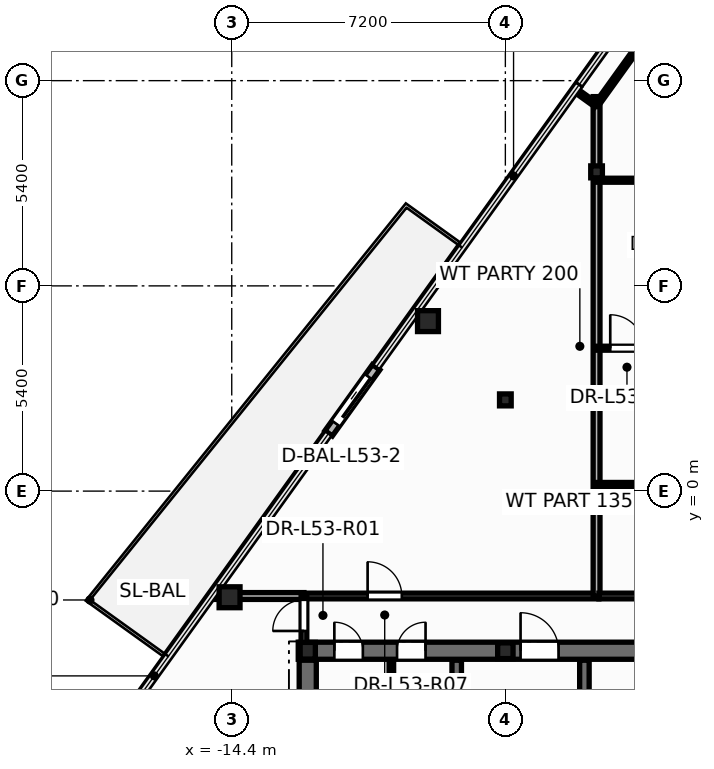
"""IFC4 building model, lengths in metres.
Left out: names, types, materials, properties, quantities, classifications, styles, units other than length and angle.
Written with IfcOpenShell. Run it as: python <this file> out.ifc"""

import sys

from ifc_helpers import new_model, si_unit, direction, frame, frame_2d, origin, origin_2d, place, context, subcontext, project, spatial, rectangle, hollow_circle, i_section, extrude, element, fill, save


model = new_model("IFC4")
c1 = context("Model", 3, precision=1e-05, world=origin(), true_north=direction((0.0, 1.0)))
c2 = subcontext(c1, "Body", "Model", "MODEL_VIEW")
j1 = project(units=[si_unit("LENGTHUNIT", "METRE"), si_unit("PLANEANGLEUNIT", "RADIAN")], contexts=[c1])
p1 = place(None, origin())
s1 = spatial("IfcSite", under=j1, at=p1, CompositionType="ELEMENT")
p2 = place(p1, origin())
s2 = spatial("IfcBuilding", under=s1, at=p2, CompositionType="ELEMENT")
p3 = place(p2, frame((0.0, 0.0, 203.7)))
s3 = spatial("IfcBuildingStorey", under=s2, at=p3, CompositionType="ELEMENT", Elevation=203.7)
for number, where, z_axis, x_axis in (
    (1, (-9.236, 4.473, 0.0), (0.0, 0.0, 1.0), (1.0, 0.0, 0.0)),
    (2, (-14.457, -2.793, 0.0), (0.0, 0.0, 1.0), (1.0, 0.0, 0.0)),
):
    element("IfcColumn", number, at=place(p3, frame(where, z_axis=z_axis, x_axis=x_axis)), inside=s3, PredefinedType="COLUMN", context=c2, shape_type="SweptSolid", body=[
        extrude(hollow_circle(Radius=0.275, WallThickness=0.024, at=origin_2d()), origin(), (0.0, 0.0, 1.0), 3.6),
    ])
p4 = place(p3, frame((-12.4, -4.2, 0.0), z_axis=(0.0, 0.0, 1.0), x_axis=(1.0, 0.0, 0.0)))
e3 = element("IfcColumn", 3, at=p4, inside=s3, PredefinedType="COLUMN", context=c2, shape_type="SweptSolid", body=[
    extrude(i_section(OverallWidth=0.4, OverallDepth=0.44, WebThickness=0.028, FlangeThickness=0.04, at=origin_2d()), origin(), (0.0, 0.0, 1.0), 3.6),
])
p5 = place(p3, frame((-7.2, -4.2, 0.0), z_axis=(0.0, 0.0, 1.0), x_axis=(1.0, 0.0, 0.0)))
e4 = element("IfcColumn", 4, at=p5, inside=s3, PredefinedType="PILASTER", context=c2, shape_type="SweptSolid", body=[
    extrude(i_section(OverallWidth=0.405, OverallDepth=0.414, WebThickness=0.022, FlangeThickness=0.032, at=origin_2d()), origin(), (0.0, 0.0, 1.0), 3.6),
])
for number, where, z_axis, x_axis in (
    (5, (-7.2, 2.4, 0.0), (0.0, 0.0, 1.0), (1.0, 0.0, 0.0)),
    (6, (-4.8, 8.4, 0.0), (0.0, 0.0, 1.0), (1.0, 0.0, 0.0)),
):
    element("IfcColumn", number, at=place(p3, frame(where, z_axis=z_axis, x_axis=x_axis)), inside=s3, PredefinedType="COLUMN", context=c2, shape_type="SweptSolid", body=[
        extrude(i_section(OverallWidth=0.307, OverallDepth=0.314, WebThickness=0.012, FlangeThickness=0.019, at=origin_2d()), origin(), (0.0, 0.0, 1.0), 3.6),
    ])
p6 = place(p3, frame((-10.601, 3.259, -0.015), z_axis=(0.0, 0.0, 1.0), x_axis=(-0.583556118157, -0.812072815061, 0.0)))
e7 = element("IfcWall", 7, at=p6, inside=s3, PredefinedType="STANDARD", context=c2, shape_type="SweptSolid", body=[
    extrude(rectangle(XDim=2.14, YDim=0.24, at=frame_2d((1.07, 0.0))), origin(), (0.0, 0.0, 1.0), 2.802),
])
p7 = place(p6, frame((0.32, 0.0, 0.015)))
e8 = element("IfcOpeningElement", 8, at=p7, cuts=e7, PredefinedType="OPENING", context=c2, shape_type="SweptSolid", body=[
    extrude(rectangle(XDim=1.506, YDim=2.204, at=frame_2d((0.75, 1.102))), frame((0.0, 0.13, 0.0), z_axis=(0.0, -1.0, 0.0), x_axis=(1.0, 0.0, 0.0)), (0.0, 0.0, 1.0), 0.26),
])
p8 = place(p3, frame((-10.2, -5.52, 0.0), z_axis=(0.0, 0.0, 1.0), x_axis=(0.0, 1.0, 0.0)))
e9 = element("IfcWall", 9, at=p8, inside=s3, PredefinedType="PARTITIONING", context=c2, shape_type="SweptSolid", body=[
    extrude(rectangle(XDim=1.12, YDim=0.12, at=frame_2d((0.56, 0.0))), origin(), (0.0, 0.0, 1.0), 3.345),
])
p9 = place(p3, frame((-12.65, -4.2, 0.0), z_axis=(0.0, 0.0, 1.0), x_axis=(1.0, 0.0, 0.0)))
e10 = element("IfcWall", 10, at=p9, inside=s3, PredefinedType="SHEAR", context=c2, shape_type="SweptSolid", body=[
    extrude(rectangle(XDim=25.3, YDim=0.45, at=frame_2d((12.65, 0.0))), origin(), (0.0, 0.0, 1.0), 3.6),
])
p10 = place(p9, frame((0.95, 0.0, 0.0)))
e11 = element("IfcOpeningElement", 11, at=p10, cuts=e10, PredefinedType="OPENING", context=c2, shape_type="SweptSolid", body=[
    extrude(rectangle(XDim=0.756, YDim=2.054, at=frame_2d((0.375, 1.027))), frame((0.0, 0.235, 0.0), z_axis=(0.0, -1.0, 0.0), x_axis=(1.0, 0.0, 0.0)), (0.0, 0.0, 1.0), 0.47),
])
p11 = place(p9, frame((2.6, 0.0, 0.0)))
e12 = element("IfcOpeningElement", 12, at=p11, cuts=e10, PredefinedType="OPENING", context=c2, shape_type="SweptSolid", body=[
    extrude(rectangle(XDim=0.756, YDim=2.054, at=frame_2d((0.375, 1.027))), frame((0.0, 0.235, 0.0), z_axis=(0.0, -1.0, 0.0), x_axis=(1.0, 0.0, 0.0)), (0.0, 0.0, 1.0), 0.47),
])
p12 = place(p9, frame((21.85, 0.0, 0.0)))
e13 = element("IfcOpeningElement", 13, at=p12, cuts=e10, PredefinedType="OPENING", context=c2, shape_type="SweptSolid", body=[
    extrude(rectangle(XDim=0.756, YDim=2.054, at=frame_2d((0.375, 1.027))), frame((0.0, 0.235, 0.0), z_axis=(0.0, -1.0, 0.0), x_axis=(1.0, 0.0, 0.0)), (0.0, 0.0, 1.0), 0.47),
])
p13 = place(p9, frame((23.5, 0.0, 0.0)))
e14 = element("IfcOpeningElement", 14, at=p13, cuts=e10, PredefinedType="OPENING", context=c2, shape_type="SweptSolid", body=[
    extrude(rectangle(XDim=0.756, YDim=2.054, at=frame_2d((0.375, 1.027))), frame((0.0, 0.235, 0.0), z_axis=(0.0, -1.0, 0.0), x_axis=(1.0, 0.0, 0.0)), (0.0, 0.0, 1.0), 0.47),
])
p14 = place(p9, frame((5.85, 0.0, 0.0)))
e15 = element("IfcOpeningElement", 15, at=p14, cuts=e10, PredefinedType="OPENING", context=c2, shape_type="SweptSolid", body=[
    extrude(rectangle(XDim=1.006, YDim=2.104, at=frame_2d((0.5, 1.052))), frame((0.0, 0.235, 0.0), z_axis=(0.0, -1.0, 0.0), x_axis=(1.0, 0.0, 0.0)), (0.0, 0.0, 1.0), 0.47),
])
p15 = place(p9, frame((10.35, 0.0, 0.0)))
e16 = element("IfcOpeningElement", 16, at=p15, cuts=e10, PredefinedType="OPENING", context=c2, shape_type="SweptSolid", body=[
    extrude(rectangle(XDim=1.406, YDim=2.154, at=frame_2d((0.7, 1.077))), frame((0.0, 0.235, 0.0), z_axis=(0.0, -1.0, 0.0), x_axis=(1.0, 0.0, 0.0)), (0.0, 0.0, 1.0), 0.47),
])
p16 = place(p9, frame((18.45, 0.0, 0.0)))
e17 = element("IfcOpeningElement", 17, at=p16, cuts=e10, PredefinedType="OPENING", context=c2, shape_type="SweptSolid", body=[
    extrude(rectangle(XDim=1.006, YDim=2.104, at=frame_2d((0.5, 1.052))), frame((0.0, 0.235, 0.0), z_axis=(0.0, -1.0, 0.0), x_axis=(1.0, 0.0, 0.0)), (0.0, 0.0, 1.0), 0.47),
])
p17 = place(p3, frame((-8.48, -13.85, 0.0), z_axis=(0.0, 0.0, 1.0), x_axis=(0.0, 1.0, 0.0)))
e18 = element("IfcWall", 18, at=p17, inside=s3, PredefinedType="SHEAR", context=c2, shape_type="SweptSolid", body=[
    extrude(rectangle(XDim=9.4, YDim=0.25, at=frame_2d((4.7, 0.0))), origin(), (0.0, 0.0, 1.0), 3.6),
])
p18 = place(p17, frame((6.95, 0.0, 0.0)))
e19 = element("IfcOpeningElement", 19, at=p18, cuts=e18, PredefinedType="OPENING", context=c2, shape_type="SweptSolid", body=[
    extrude(rectangle(XDim=1.006, YDim=2.104, at=frame_2d((0.5, 1.052))), frame((0.0, 0.135, 0.0), z_axis=(0.0, -1.0, 0.0), x_axis=(1.0, 0.0, 0.0)), (0.0, 0.0, 1.0), 0.27),
])
p19 = place(p3, frame((-5.12, -13.85, 0.0), z_axis=(0.0, 0.0, 1.0), x_axis=(0.0, 1.0, 0.0)))
e20 = element("IfcWall", 20, at=p19, inside=s3, PredefinedType="SHEAR", context=c2, shape_type="SweptSolid", body=[
    extrude(rectangle(XDim=9.4, YDim=0.25, at=frame_2d((4.7, 0.0))), origin(), (0.0, 0.0, 1.0), 3.6),
])
p20 = place(p3, frame((-12.4, -13.85, 0.0), z_axis=(0.0, 0.0, 1.0), x_axis=(0.0, 1.0, 0.0)))
e21 = element("IfcWall", 21, at=p20, inside=s3, PredefinedType="SHEAR", context=c2, shape_type="SweptSolid", body=[
    extrude(rectangle(XDim=9.4, YDim=0.45, at=frame_2d((4.7, 0.0))), origin(), (0.0, 0.0, 1.0), 3.6),
])
p21 = place(p3, frame((-12.5, -2.76, 0.0), z_axis=(0.0, 0.0, 1.0), x_axis=(1.0, 0.0, 0.0)))
e22 = element("IfcWall", 22, at=p21, inside=s3, PredefinedType="PARTITIONING", context=c2, shape_type="SweptSolid", body=[
    extrude(rectangle(XDim=7.76, YDim=0.15, at=frame_2d((3.88, 0.0))), origin(), (0.0, 0.0, 1.0), 2.32),
])
p22 = place(p21, frame((1.675, 0.0, 0.0)))
e23 = element("IfcOpeningElement", 23, at=p22, cuts=e22, PredefinedType="OPENING", context=c2, shape_type="SweptSolid", body=[
    extrude(rectangle(XDim=0.906, YDim=2.104, at=frame_2d((0.45, 1.052))), frame((0.0, 0.085, 0.0), z_axis=(0.0, -1.0, 0.0), x_axis=(1.0, 0.0, 0.0)), (0.0, 0.0, 1.0), 0.17),
])
p23 = place(p3, frame((-4.8, -2.76, 0.0), z_axis=(0.0, 0.0, 1.0), x_axis=(0.0, 1.0, 0.0)))
e24 = element("IfcWall", 24, at=p23, inside=s3, PredefinedType="PARTITIONING", context=c2, shape_type="SweptSolid", body=[
    extrude(rectangle(XDim=13.14, YDim=0.18, at=frame_2d((6.57, 0.0))), origin(), (0.0, 0.0, 1.0), 2.32),
])
p24 = place(p3, frame((-4.8, 8.18, 0.0), z_axis=(0.0, 0.0, 1.0), x_axis=(1.0, 0.0, 0.0)))
e25 = element("IfcWall", 25, at=p24, inside=s3, PredefinedType="PARTITIONING", context=c2, shape_type="SweptSolid", body=[
    extrude(rectangle(XDim=3.46, YDim=0.105, at=frame_2d((1.73, 0.0))), origin(), (0.0, 0.0, 1.0), 2.62),
])
p25 = place(p24, frame((1.944, 0.0, 0.0)))
e26 = element("IfcOpeningElement", 26, at=p25, cuts=e25, PredefinedType="OPENING", context=c2, shape_type="SweptSolid", body=[
    extrude(rectangle(XDim=0.886, YDim=2.104, at=frame_2d((0.44, 1.052))), frame((0.0, 0.062, 0.0), z_axis=(0.0, -1.0, 0.0), x_axis=(1.0, 0.0, 0.0)), (0.0, 0.0, 1.0), 0.125),
])
p26 = place(p3, frame((-4.738, -2.76, 0.0), z_axis=(0.0, 0.0, 1.0), x_axis=(1.0, 0.0, 0.0)))
e27 = element("IfcWall", 27, at=p26, inside=s3, PredefinedType="PARTITIONING", context=c2, shape_type="SweptSolid", body=[
    extrude(rectangle(XDim=2.476, YDim=0.15, at=frame_2d((1.238, 0.0))), origin(), (0.0, 0.0, 1.0), 2.964),
])
p27 = place(p3, frame((-4.8, 0.16, 0.0), z_axis=(0.0, 0.0, 1.0), x_axis=(1.0, 0.0, 0.0)))
e28 = element("IfcWall", 28, at=p27, inside=s3, PredefinedType="PARTITIONING", context=c2, shape_type="SweptSolid", body=[
    extrude(rectangle(XDim=2.6, YDim=0.135, at=frame_2d((1.3, 0.0))), origin(), (0.0, 0.0, 1.0), 2.964),
])
p28 = place(p3, frame((-4.8, 3.76, 0.0), z_axis=(0.0, 0.0, 1.0), x_axis=(1.0, 0.0, 0.0)))
e29 = element("IfcWall", 29, at=p28, inside=s3, PredefinedType="PARTITIONING", context=c2, shape_type="SweptSolid", body=[
    extrude(rectangle(XDim=2.6, YDim=0.105, at=frame_2d((1.3, 0.0))), origin(), (0.0, 0.0, 1.0), 2.964),
])
p29 = place(p28, frame((0.36, 0.0, 0.0)))
e30 = element("IfcOpeningElement", 30, at=p29, cuts=e29, PredefinedType="OPENING", context=c2, shape_type="SweptSolid", body=[
    extrude(rectangle(XDim=0.886, YDim=2.104, at=frame_2d((0.44, 1.052))), frame((0.0, 0.062, 0.0), z_axis=(0.0, -1.0, 0.0), x_axis=(1.0, 0.0, 0.0)), (0.0, 0.0, 1.0), 0.125),
])
p30 = place(p3, frame((-14.926, -2.76, 0.0), z_axis=(0.0, 0.0, 1.0), x_axis=(1.0, 0.0, 0.0)))
e31 = element("IfcWall", 31, at=p30, inside=s3, PredefinedType="PARTITIONING", context=c2, shape_type="SweptSolid", body=[
    extrude(rectangle(XDim=2.426, YDim=0.18, at=frame_2d((1.213, 0.0))), origin(), (0.0, 0.0, 1.0), 2.62),
])
p31 = place(p3, frame((-3.407, 12.104, 0.0), z_axis=(0.0, 0.0, 1.0), x_axis=(-0.583583646273, -0.81205303263, 0.0)))
e32 = element("IfcWall", 32, at=p31, inside=s3, PredefinedType="PARTITIONING", context=c2, shape_type="SweptSolid", body=[
    extrude(rectangle(XDim=2.4, YDim=0.12, at=frame_2d((1.2, 0.0))), origin(), (0.0, 0.0, 1.0), 2.62),
])
p32 = place(p3, frame((-12.5, -4.24, 0.0), z_axis=(0.0, 0.0, 1.0), x_axis=(0.0, 1.0, 0.0)))
e33 = element("IfcWall", 33, at=p32, inside=s3, PredefinedType="PARTITIONING", context=c2, shape_type="SweptSolid", body=[
    extrude(rectangle(XDim=1.48, YDim=0.15, at=frame_2d((0.74, 0.0))), origin(), (0.0, 0.0, 1.0), 2.32),
])
p33 = place(p32, frame((0.56, 0.0, 0.0)))
e34 = element("IfcOpeningElement", 34, at=p33, cuts=e33, PredefinedType="OPENING", context=c2, shape_type="SweptSolid", body=[
    extrude(rectangle(XDim=0.826, YDim=2.104, at=frame_2d((0.41, 1.052))), frame((0.0, 0.085, 0.0), z_axis=(0.0, -1.0, 0.0), x_axis=(1.0, 0.0, 0.0)), (0.0, 0.0, 1.0), 0.17),
])
p34 = place(p3, frame((-4.808, 10.155, 0.0), z_axis=(0.0, 0.0, 1.0), x_axis=(-0.811907418628, 0.583786213932, 0.0)))
e35 = element("IfcWall", 35, at=p34, inside=s3, PredefinedType="PARTITIONING", context=c2, shape_type="SweptSolid", body=[
    extrude(rectangle(XDim=0.67, YDim=0.12, at=frame_2d((0.335, 0.0))), origin(), (0.0, 0.0, 1.0), 2.787),
])
p35 = place(p7, origin())
e36 = element("IfcDoor", 36, at=p35, inside=s3, OperationType="SLIDING_TO_RIGHT", PredefinedType="DOOR", context=c2, shape_type="SweptSolid", body=[
    extrude(rectangle(XDim=1.5, YDim=2.2, at=frame_2d((0.75, 1.1))), frame((0.0, 0.025, 0.0), z_axis=(0.0, -1.0, 0.0), x_axis=(1.0, 0.0, 0.0)), (0.0, 0.0, 1.0), 0.05),
])
fill(e8, e36)
p36 = place(p10, origin())
e37 = element("IfcDoor", 37, at=p36, inside=s3, OperationType="SINGLE_SWING_LEFT", PredefinedType="DOOR", context=c2, shape_type="SweptSolid", body=[
    extrude(rectangle(XDim=0.75, YDim=2.05, at=frame_2d((0.375, 1.025))), frame((0.0, 0.025, 0.0), z_axis=(0.0, -1.0, 0.0), x_axis=(1.0, 0.0, 0.0)), (0.0, 0.0, 1.0), 0.05),
])
fill(e11, e37)
p37 = place(p11, origin())
e38 = element("IfcDoor", 38, at=p37, inside=s3, OperationType="SINGLE_SWING_RIGHT", PredefinedType="DOOR", context=c2, shape_type="SweptSolid", body=[
    extrude(rectangle(XDim=0.75, YDim=2.05, at=frame_2d((0.375, 1.025))), frame((0.0, 0.025, 0.0), z_axis=(0.0, -1.0, 0.0), x_axis=(1.0, 0.0, 0.0)), (0.0, 0.0, 1.0), 0.05),
])
fill(e12, e38)
p38 = place(p14, origin())
e39 = element("IfcDoor", 39, at=p38, inside=s3, OperationType="SINGLE_SWING_LEFT", PredefinedType="DOOR", context=c2, shape_type="SweptSolid", body=[
    extrude(rectangle(XDim=1.0, YDim=2.1, at=frame_2d((0.5, 1.05))), frame((0.0, 0.025, 0.0), z_axis=(0.0, -1.0, 0.0), x_axis=(1.0, 0.0, 0.0)), (0.0, 0.0, 1.0), 0.05),
])
fill(e15, e39)
p39 = place(p33, origin())
e40 = element("IfcDoor", 40, at=p39, inside=s3, OperationType="SINGLE_SWING_LEFT", PredefinedType="DOOR", context=c2, shape_type="SweptSolid", body=[
    extrude(rectangle(XDim=0.82, YDim=2.1, at=frame_2d((0.41, 1.05))), frame((0.0, 0.025, 0.0), z_axis=(0.0, -1.0, 0.0), x_axis=(1.0, 0.0, 0.0)), (0.0, 0.0, 1.0), 0.05),
])
fill(e34, e40)
p40 = place(p22, origin())
e41 = element("IfcDoor", 41, at=p40, inside=s3, OperationType="SINGLE_SWING_LEFT", PredefinedType="DOOR", context=c2, shape_type="SweptSolid", body=[
    extrude(rectangle(XDim=0.9, YDim=2.1, at=frame_2d((0.45, 1.05))), frame((0.0, 0.025, 0.0), z_axis=(0.0, -1.0, 0.0), x_axis=(1.0, 0.0, 0.0)), (0.0, 0.0, 1.0), 0.05),
])
fill(e23, e41)
p41 = place(p29, origin())
e42 = element("IfcDoor", 42, at=p41, inside=s3, OperationType="SINGLE_SWING_LEFT", PredefinedType="DOOR", context=c2, shape_type="SweptSolid", body=[
    extrude(rectangle(XDim=0.88, YDim=2.1, at=frame_2d((0.44, 1.05))), frame((0.0, 0.025, 0.0), z_axis=(0.0, -1.0, 0.0), x_axis=(1.0, 0.0, 0.0)), (0.0, 0.0, 1.0), 0.05),
])
fill(e30, e42)
save(model, sys.argv[1])
